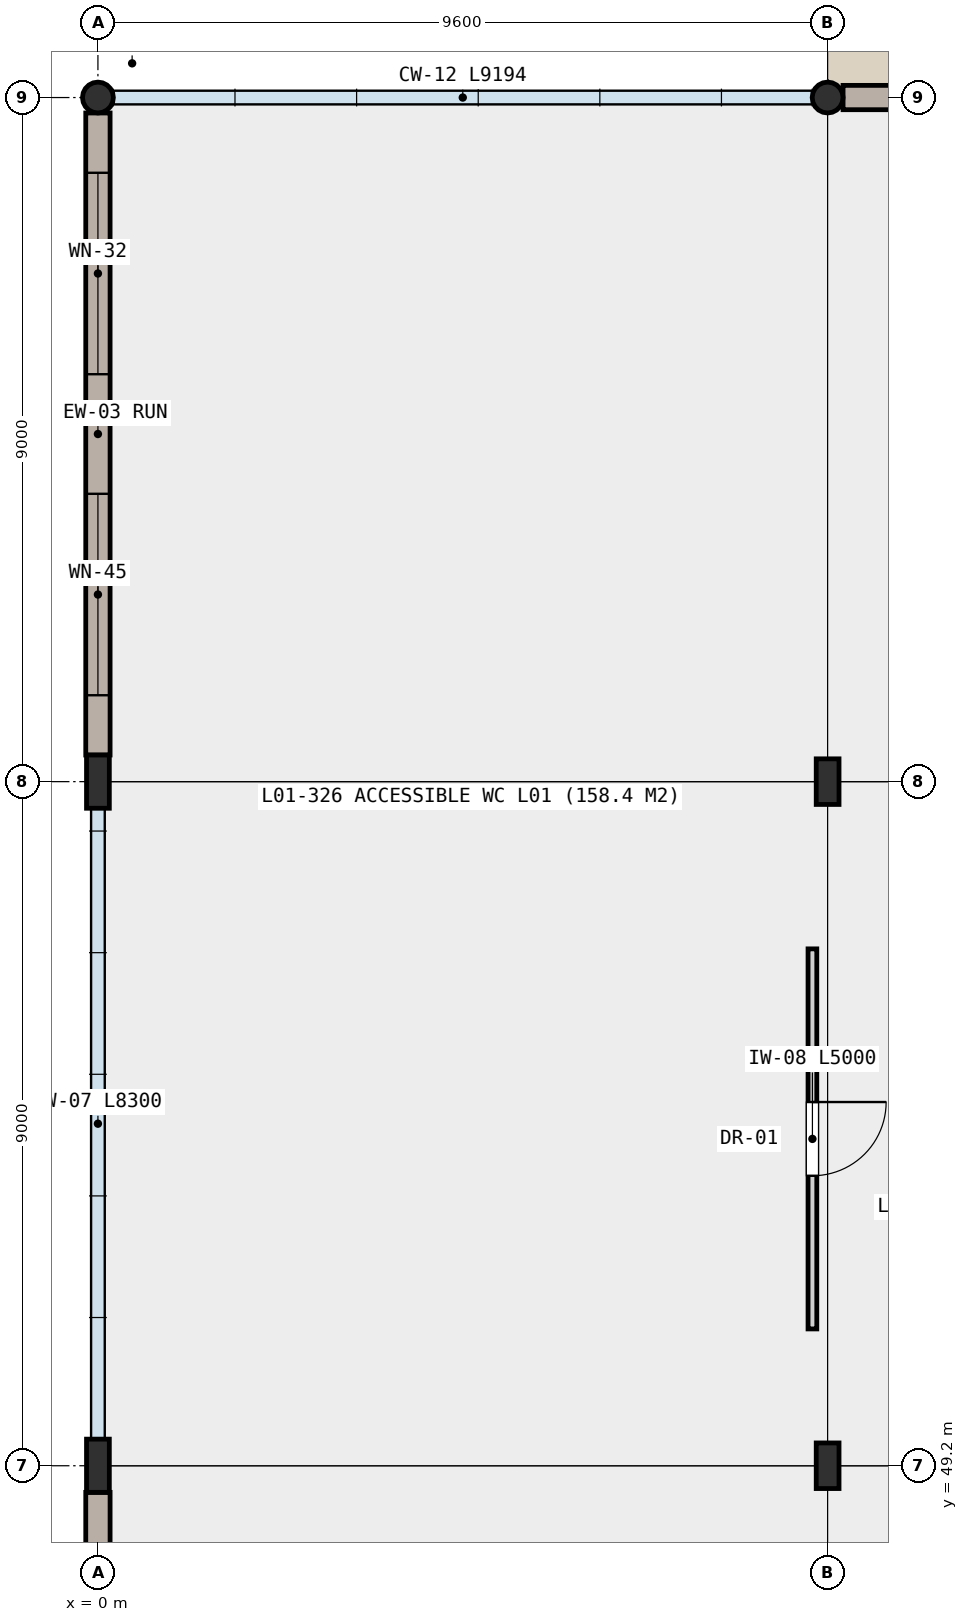
"""IFC4 building model, lengths in metres.
Left out: names, types, materials, properties, quantities, classifications, styles, units other than length and angle.
Written with IfcOpenShell. Run it as: python <this file> out.ifc"""

import sys

from ifc_helpers import new_model, si_unit, direction, frame, frame_2d, origin, origin_2d, place, context, subcontext, project, spatial, rectangle, hollow_circle, i_section, extrude, element, fill, save


model = new_model("IFC4")
c1 = context("Model", 3, precision=1e-05, world=origin(), true_north=direction((0.0, 1.0)))
c2 = subcontext(c1, "Body", "Model", "MODEL_VIEW")
j1 = project(units=[si_unit("LENGTHUNIT", "METRE"), si_unit("PLANEANGLEUNIT", "RADIAN")], contexts=[c1])
p1 = place(None, origin())
s1 = spatial("IfcSite", under=j1, at=p1, CompositionType="ELEMENT")
p2 = place(p1, origin())
s2 = spatial("IfcBuilding", under=s1, at=p2, CompositionType="ELEMENT")
p3 = place(p2, frame((0.0, 0.0, 5.4)))
s3 = spatial("IfcBuildingStorey", under=s2, at=p3, CompositionType="ELEMENT", Elevation=5.4)
for number, where, z_axis, x_axis in (
    (1, (0.0, 49.2, 0.0), (0.0, 0.0, 1.0), (1.0, 0.0, 0.0)),
    (2, (0.0, 58.2, 0.0), (0.0, 0.0, 1.0), (1.0, 0.0, 0.0)),
):
    element("IfcColumn", number, at=place(p3, frame(where, z_axis=z_axis, x_axis=x_axis)), inside=s3, PredefinedType="COLUMN", context=c2, shape_type="SweptSolid", body=[
        extrude(i_section(OverallWidth=0.3, OverallDepth=0.7, WebThickness=0.017, FlangeThickness=0.032, FilletRadius=0.027, at=origin_2d()), origin(), (0.0, 0.0, 1.0), 4.8),
    ])
p4 = place(p3, frame((0.0, 67.2, 0.0), z_axis=(0.0, 0.0, 1.0), x_axis=(1.0, 0.0, 0.0)))
e3 = element("IfcColumn", 3, at=p4, inside=s3, PredefinedType="COLUMN", context=c2, shape_type="SweptSolid", body=[
    extrude(hollow_circle(Radius=0.203, WallThickness=0.02, at=origin_2d()), origin(), (0.0, 0.0, 1.0), 4.8),
])
for number, where, z_axis, x_axis in (
    (4, (9.6, 49.2, 0.0), (0.0, 0.0, 1.0), (1.0, 0.0, 0.0)),
    (5, (9.6, 58.2, 0.0), (0.0, 0.0, 1.0), (1.0, 0.0, 0.0)),
):
    element("IfcColumn", number, at=place(p3, frame(where, z_axis=z_axis, x_axis=x_axis)), inside=s3, PredefinedType="COLUMN", context=c2, shape_type="SweptSolid", body=[
        extrude(i_section(OverallWidth=0.3, OverallDepth=0.6, WebThickness=0.015, FlangeThickness=0.03, FilletRadius=0.027, at=origin_2d()), origin(), (0.0, 0.0, 1.0), 4.8),
    ])
p5 = place(p3, frame((9.6, 67.2, 0.0), z_axis=(0.0, 0.0, 1.0), x_axis=(1.0, 0.0, 0.0)))
e6 = element("IfcColumn", 6, at=p5, inside=s3, PredefinedType="COLUMN", context=c2, shape_type="SweptSolid", body=[
    extrude(hollow_circle(Radius=0.203, WallThickness=0.02, at=origin_2d()), origin(), (0.0, 0.0, 1.0), 4.8),
])
p6 = place(p3, frame((0.0, 40.55, 0.0), z_axis=(0.0, 0.0, 1.0), x_axis=(0.0, 1.0, 0.0)))
e7 = element("IfcWall", 7, at=p6, inside=s3, PredefinedType="SOLIDWALL", context=c2, shape_type="SweptSolid", body=[
    extrude(rectangle(XDim=8.3, YDim=0.32, at=frame_2d((4.15, 0.0))), origin(), (0.0, 0.0, 1.0), 4.11),
])
p7 = place(p6, frame((0.825, 0.0, 0.85)))
e8 = element("IfcOpeningElement", 8, at=p7, cuts=e7, PredefinedType="OPENING", context=c2, shape_type="SweptSolid", body=[
    extrude(rectangle(XDim=2.5, YDim=2.15, at=frame_2d((1.25, 1.075))), frame((0.0, 0.17, 0.0), z_axis=(0.0, -1.0, 0.0), x_axis=(1.0, 0.0, 0.0)), (0.0, 0.0, 1.0), 0.34),
])
p8 = place(p6, frame((4.9, 0.0, 0.85)))
e9 = element("IfcOpeningElement", 9, at=p8, cuts=e7, PredefinedType="OPENING", context=c2, shape_type="SweptSolid", body=[
    extrude(rectangle(XDim=2.65, YDim=1.5, at=frame_2d((1.325, 0.75))), frame((0.0, 0.17, 0.0), z_axis=(0.0, -1.0, 0.0), x_axis=(1.0, 0.0, 0.0)), (0.0, 0.0, 1.0), 0.34),
])
p9 = place(p3, frame((0.0, 58.55, 0.0), z_axis=(0.0, 0.0, 1.0), x_axis=(0.0, 1.0, 0.0)))
e10 = element("IfcWall", 10, at=p9, inside=s3, PredefinedType="SOLIDWALL", context=c2, shape_type="SweptSolid", body=[
    extrude(rectangle(XDim=8.447, YDim=0.32, at=frame_2d((4.223, 0.0))), origin(), (0.0, 0.0, 1.0), 4.11),
])
p10 = place(p9, frame((0.787, 0.0, 0.85)))
e11 = element("IfcOpeningElement", 11, at=p10, cuts=e10, PredefinedType="OPENING", context=c2, shape_type="SweptSolid", body=[
    extrude(rectangle(XDim=2.65, YDim=1.85, at=frame_2d((1.325, 0.925))), frame((0.0, 0.17, 0.0), z_axis=(0.0, -1.0, 0.0), x_axis=(1.0, 0.0, 0.0)), (0.0, 0.0, 1.0), 0.34),
])
p11 = place(p9, frame((5.01, 0.0, 0.85)))
e12 = element("IfcOpeningElement", 12, at=p11, cuts=e10, PredefinedType="OPENING", context=c2, shape_type="SweptSolid", body=[
    extrude(rectangle(XDim=2.65, YDim=2.15, at=frame_2d((1.325, 1.075))), frame((0.0, 0.17, 0.0), z_axis=(0.0, -1.0, 0.0), x_axis=(1.0, 0.0, 0.0)), (0.0, 0.0, 1.0), 0.34),
])
p12 = place(p3, frame((9.803, 67.2, 0.0), z_axis=(0.0, 0.0, 1.0), x_axis=(1.0, 0.0, 0.0)))
e13 = element("IfcWall", 13, at=p12, inside=s3, PredefinedType="SOLIDWALL", context=c2, shape_type="SweptSolid", body=[
    extrude(rectangle(XDim=9.194, YDim=0.32, at=frame_2d((4.597, 0.0))), origin(), (0.0, 0.0, 1.0), 3.91),
])
p13 = place(p12, frame((0.898, 0.0, 0.85)))
e14 = element("IfcOpeningElement", 14, at=p13, cuts=e13, PredefinedType="OPENING", context=c2, shape_type="SweptSolid", body=[
    extrude(rectangle(XDim=2.8, YDim=1.5, at=frame_2d((1.4, 0.75))), frame((0.0, 0.17, 0.0), z_axis=(0.0, -1.0, 0.0), x_axis=(1.0, 0.0, 0.0)), (0.0, 0.0, 1.0), 0.34),
])
p14 = place(p12, frame((5.495, 0.0, 0.85)))
e15 = element("IfcOpeningElement", 15, at=p14, cuts=e13, PredefinedType="OPENING", context=c2, shape_type="SweptSolid", body=[
    extrude(rectangle(XDim=2.8, YDim=1.85, at=frame_2d((1.4, 0.925))), frame((0.0, 0.17, 0.0), z_axis=(0.0, -1.0, 0.0), x_axis=(1.0, 0.0, 0.0)), (0.0, 0.0, 1.0), 0.34),
])
p15 = place(p3, frame((9.4, 56.0, 0.0), z_axis=(0.0, 0.0, 1.0), x_axis=(0.0, -1.0, 0.0)))
e16 = element("IfcWall", 16, at=p15, inside=s3, PredefinedType="PARTITIONING", context=c2, shape_type="SweptSolid", body=[
    extrude(rectangle(XDim=5.0, YDim=0.115, at=frame_2d((2.5, 0.0))), origin(), (0.0, 0.0, 1.0), 3.96),
])
p16 = place(p15, frame((2.015, 0.0, 0.0)))
e17 = element("IfcOpeningElement", 17, at=p16, cuts=e16, PredefinedType="OPENING", context=c2, shape_type="SweptSolid", body=[
    extrude(rectangle(XDim=0.97, YDim=2.12, at=frame_2d((0.485, 1.06))), frame((0.0, 0.067, 0.0), z_axis=(0.0, -1.0, 0.0), x_axis=(1.0, 0.0, 0.0)), (0.0, 0.0, 1.0), 0.135),
])
p17 = place(p10, origin())
e18 = element("IfcWindow", 18, at=p17, inside=s3, PartitioningType="SINGLE_PANEL", PredefinedType="WINDOW", context=c2, shape_type="SweptSolid", body=[
    extrude(rectangle(XDim=2.65, YDim=1.85, at=frame_2d((1.325, 0.925))), frame((0.0, 0.03, 0.0), z_axis=(0.0, -1.0, 0.0), x_axis=(1.0, 0.0, 0.0)), (0.0, 0.0, 1.0), 0.06),
])
fill(e11, e18)
p18 = place(p11, origin())
e19 = element("IfcWindow", 19, at=p18, inside=s3, PartitioningType="SINGLE_PANEL", PredefinedType="WINDOW", context=c2, shape_type="SweptSolid", body=[
    extrude(rectangle(XDim=2.65, YDim=2.15, at=frame_2d((1.325, 1.075))), frame((0.0, 0.03, 0.0), z_axis=(0.0, -1.0, 0.0), x_axis=(1.0, 0.0, 0.0)), (0.0, 0.0, 1.0), 0.06),
])
fill(e12, e19)
p19 = place(p16, origin())
e20 = element("IfcDoor", 20, at=p19, inside=s3, OperationType="SINGLE_SWING_LEFT", PredefinedType="DOOR", context=c2, shape_type="SweptSolid", body=[
    extrude(rectangle(XDim=0.97, YDim=2.12, at=frame_2d((0.485, 1.06))), frame((0.0, 0.025, 0.0), z_axis=(0.0, -1.0, 0.0), x_axis=(1.0, 0.0, 0.0)), (0.0, 0.0, 1.0), 0.05),
])
fill(e17, e20)
save(model, sys.argv[1])
